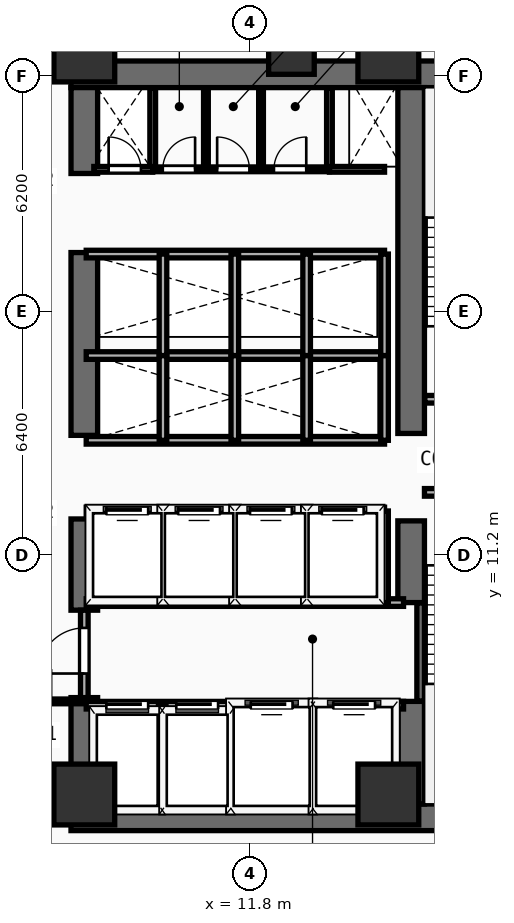
"""IFC4 building model, lengths in metres.
Left out: names, types, materials, properties, quantities, classifications, styles, units other than length and angle.
Written with IfcOpenShell. Run it as: python <this file> out.ifc"""

import sys

from ifc_helpers import new_model, si_unit, direction, frame, frame_2d, origin, origin_2d, place, context, subcontext, project, spatial, rectangle, extrude, element, fill, save


model = new_model("IFC4")
c1 = context("Model", 3, precision=1e-05, world=origin(), true_north=direction((0.0, 1.0)))
c2 = subcontext(c1, "Body", "Model", "MODEL_VIEW")
j1 = project(units=[si_unit("LENGTHUNIT", "METRE"), si_unit("PLANEANGLEUNIT", "RADIAN")], contexts=[c1])
p1 = place(None, origin())
s1 = spatial("IfcSite", under=j1, at=p1, CompositionType="ELEMENT")
p2 = place(p1, origin())
s2 = spatial("IfcBuilding", under=s1, at=p2, CompositionType="ELEMENT")
p3 = place(p2, frame((0.0, 0.0, 79.0)))
s3 = spatial("IfcBuildingStorey", under=s2, at=p3, CompositionType="ELEMENT", Elevation=79.0)
for number, where, z_axis, x_axis in (
    (1, (7.1, 4.3, 0.0), (0.0, 0.0, 1.0), (1.0, 0.0, 0.0)),
    (2, (7.1, 23.85, 0.0), (0.0, 0.0, 1.0), (1.0, 0.0, 0.0)),
):
    element("IfcWall", number, at=place(p3, frame(where, z_axis=z_axis, x_axis=x_axis)), inside=s3, PredefinedType="SHEAR", context=c2, shape_type="SweptSolid", body=[
        extrude(rectangle(XDim=14.05, YDim=0.7, at=frame_2d((7.025, 0.0))), origin(), (0.0, 0.0, 1.0), 3.42),
    ])
p4 = place(p3, frame((7.45, 4.65, 0.0), z_axis=(0.0, 0.0, 1.0), x_axis=(0.0, 1.0, 0.0)))
e3 = element("IfcWall", 3, at=p4, inside=s3, PredefinedType="SHEAR", context=c2, shape_type="SweptSolid", body=[
    extrude(rectangle(XDim=2.8, YDim=0.7, at=frame_2d((1.4, 0.0))), origin(), (0.0, 0.0, 1.0), 3.42),
])
p5 = place(p3, frame((7.45, 9.75, 0.0), z_axis=(0.0, 0.0, 1.0), x_axis=(0.0, 1.0, 0.0)))
e4 = element("IfcWall", 4, at=p5, inside=s3, PredefinedType="SHEAR", context=c2, shape_type="SweptSolid", body=[
    extrude(rectangle(XDim=2.4, YDim=0.7, at=frame_2d((1.2, 0.0))), origin(), (0.0, 0.0, 1.0), 3.42),
])
p6 = place(p3, frame((7.45, 14.35, 0.0), z_axis=(0.0, 0.0, 1.0), x_axis=(0.0, 1.0, 0.0)))
e5 = element("IfcWall", 5, at=p6, inside=s3, PredefinedType="SHEAR", context=c2, shape_type="SweptSolid", body=[
    extrude(rectangle(XDim=4.81, YDim=0.7, at=frame_2d((2.405, 0.0))), origin(), (0.0, 0.0, 1.0), 3.42),
])
p7 = place(p3, frame((7.45, 21.24, 0.0), z_axis=(0.0, 0.0, 1.0), x_axis=(0.0, 1.0, 0.0)))
e6 = element("IfcWall", 6, at=p7, inside=s3, PredefinedType="SHEAR", context=c2, shape_type="SweptSolid", body=[
    extrude(rectangle(XDim=2.26, YDim=0.7, at=frame_2d((1.13, 0.0))), origin(), (0.0, 0.0, 1.0), 3.42),
])
p8 = place(p3, frame((16.05, 4.65, 0.0), z_axis=(0.0, 0.0, 1.0), x_axis=(0.0, 1.0, 0.0)))
e7 = element("IfcWall", 7, at=p8, inside=s3, PredefinedType="SHEAR", context=c2, shape_type="SweptSolid", body=[
    extrude(rectangle(XDim=2.7, YDim=0.7, at=frame_2d((1.35, 0.0))), origin(), (0.0, 0.0, 1.0), 3.42),
])
p9 = place(p3, frame((16.05, 9.95, 0.0), z_axis=(0.0, 0.0, 1.0), x_axis=(0.0, 1.0, 0.0)))
e8 = element("IfcWall", 8, at=p9, inside=s3, PredefinedType="SHEAR", context=c2, shape_type="SweptSolid", body=[
    extrude(rectangle(XDim=2.15, YDim=0.7, at=frame_2d((1.075, 0.0))), origin(), (0.0, 0.0, 1.0), 3.42),
])
p10 = place(p3, frame((16.05, 14.4, 0.0), z_axis=(0.0, 0.0, 1.0), x_axis=(0.0, 1.0, 0.0)))
e9 = element("IfcWall", 9, at=p10, inside=s3, PredefinedType="SHEAR", context=c2, shape_type="SweptSolid", body=[
    extrude(rectangle(XDim=9.1, YDim=0.7, at=frame_2d((4.55, 0.0))), origin(), (0.0, 0.0, 1.0), 3.42),
])
for number, where, z_axis, x_axis in (
    (10, (7.45, 4.9, 0.0), (0.0, 0.0, 1.0), (1.0, 0.0, 0.0)),
    (11, (15.45, 4.9, 0.0), (0.0, 0.0, 1.0), (1.0, 0.0, 0.0)),
    (12, (7.45, 24.45, 0.0), (0.0, 0.0, 1.0), (1.0, 0.0, 0.0)),
    (13, (15.45, 24.45, 0.0), (0.0, 0.0, 1.0), (1.0, 0.0, 0.0)),
):
    element("IfcColumn", number, at=place(p3, frame(where, z_axis=z_axis, x_axis=x_axis)), inside=s3, PredefinedType="COLUMN", context=c2, shape_type="SweptSolid", body=[
        extrude(rectangle(XDim=1.6, YDim=1.6, at=origin_2d()), origin(), (0.0, 0.0, 1.0), 3.42),
    ])
p11 = place(p3, frame((12.9, 24.45, 0.0), z_axis=(0.0, 0.0, 1.0), x_axis=(1.0, 0.0, 0.0)))
e14 = element("IfcColumn", 14, at=p11, inside=s3, PredefinedType="COLUMN", context=c2, shape_type="SweptSolid", body=[
    extrude(rectangle(XDim=1.2, YDim=1.2, at=origin_2d()), origin(), (0.0, 0.0, 1.0), 3.42),
])
p12 = place(p3, frame((16.3, 7.36, 0.0), z_axis=(0.0, 0.0, 1.0), x_axis=(0.0, 1.0, 0.0)))
e15 = element("IfcWall", 15, at=p12, inside=s3, PredefinedType="SHEAR", context=c2, shape_type="SweptSolid", body=[
    extrude(rectangle(XDim=2.58, YDim=0.2, at=frame_2d((1.29, 0.0))), origin(), (0.0, 0.0, 1.0), 3.42),
])
p13 = place(p3, frame((16.4, 12.85, 0.0), z_axis=(0.0, 0.0, 1.0), x_axis=(1.0, 0.0, 0.0)))
e16 = element("IfcWall", 16, at=p13, inside=s3, PredefinedType="PARTITIONING", context=c2, shape_type="SweptSolid", body=[
    extrude(rectangle(XDim=3.96, YDim=0.2, at=frame_2d((1.98, 0.0))), origin(), (0.0, 0.0, 1.0), 3.42),
])
p14 = place(p13, frame((1.304, 0.0, 0.0)))
e17 = element("IfcOpeningElement", 17, at=p14, cuts=e16, PredefinedType="OPENING", context=c2, shape_type="SweptSolid", body=[
    extrude(rectangle(XDim=1.1, YDim=2.2, at=frame_2d((0.55, 1.1))), frame((0.0, 0.11, 0.0), z_axis=(0.0, -1.0, 0.0), x_axis=(1.0, 0.0, 0.0)), (0.0, 0.0, 1.0), 0.22),
])
p15 = place(p3, frame((16.41, 15.3, 0.0), z_axis=(0.0, 0.0, 1.0), x_axis=(1.0, 0.0, 0.0)))
e18 = element("IfcWall", 18, at=p15, inside=s3, PredefinedType="PARTITIONING", context=c2, shape_type="SweptSolid", body=[
    extrude(rectangle(XDim=3.95, YDim=0.2, at=frame_2d((1.975, 0.0))), origin(), (0.0, 0.0, 1.0), 3.42),
])
p16 = place(p15, frame((1.294, 0.0, 0.0)))
e19 = element("IfcOpeningElement", 19, at=p16, cuts=e18, PredefinedType="OPENING", context=c2, shape_type="SweptSolid", body=[
    extrude(rectangle(XDim=1.1, YDim=2.2, at=frame_2d((0.55, 1.1))), frame((0.0, 0.11, 0.0), z_axis=(0.0, -1.0, 0.0), x_axis=(1.0, 0.0, 0.0)), (0.0, 0.0, 1.0), 0.22),
])
p17 = place(p3, frame((7.5, 7.25, 0.0), z_axis=(0.0, 0.0, 1.0), x_axis=(1.0, 0.0, 0.0)))
e20 = element("IfcWall", 20, at=p17, inside=s3, PredefinedType="PARTITIONING", context=c2, shape_type="SweptSolid", body=[
    extrude(rectangle(XDim=8.35, YDim=0.2, at=frame_2d((4.175, 0.0))), origin(), (0.0, 0.0, 1.0), 3.42),
])
p18 = place(p17, frame((0.53, 0.0, 0.0)))
e21 = element("IfcOpeningElement", 21, at=p18, cuts=e20, PredefinedType="OPENING", context=c2, shape_type="SweptSolid", body=[
    extrude(rectangle(XDim=1.1, YDim=2.2, at=frame_2d((0.55, 1.1))), frame((0.0, 0.11, 0.0), z_axis=(0.0, -1.0, 0.0), x_axis=(1.0, 0.0, 0.0)), (0.0, 0.0, 1.0), 0.22),
])
p19 = place(p17, frame((2.37, 0.0, 0.0)))
e22 = element("IfcOpeningElement", 22, at=p19, cuts=e20, PredefinedType="OPENING", context=c2, shape_type="SweptSolid", body=[
    extrude(rectangle(XDim=1.1, YDim=2.2, at=frame_2d((0.55, 1.1))), frame((0.0, 0.11, 0.0), z_axis=(0.0, -1.0, 0.0), x_axis=(1.0, 0.0, 0.0)), (0.0, 0.0, 1.0), 0.22),
])
p20 = place(p17, frame((4.33, 0.0, 0.0)))
e23 = element("IfcOpeningElement", 23, at=p20, cuts=e20, PredefinedType="OPENING", context=c2, shape_type="SweptSolid", body=[
    extrude(rectangle(XDim=1.1, YDim=2.2, at=frame_2d((0.55, 1.1))), frame((0.0, 0.11, 0.0), z_axis=(0.0, -1.0, 0.0), x_axis=(1.0, 0.0, 0.0)), (0.0, 0.0, 1.0), 0.22),
])
p21 = place(p17, frame((6.5, 0.0, 0.0)))
e24 = element("IfcOpeningElement", 24, at=p21, cuts=e20, PredefinedType="OPENING", context=c2, shape_type="SweptSolid", body=[
    extrude(rectangle(XDim=1.1, YDim=2.2, at=frame_2d((0.55, 1.1))), frame((0.0, 0.11, 0.0), z_axis=(0.0, -1.0, 0.0), x_axis=(1.0, 0.0, 0.0)), (0.0, 0.0, 1.0), 0.22),
])
p22 = place(p3, frame((7.5, 9.95, 0.0), z_axis=(0.0, 0.0, 1.0), x_axis=(1.0, 0.0, 0.0)))
e25 = element("IfcWall", 25, at=p22, inside=s3, PredefinedType="PARTITIONING", context=c2, shape_type="SweptSolid", body=[
    extrude(rectangle(XDim=8.35, YDim=0.2, at=frame_2d((4.175, 0.0))), origin(), (0.0, 0.0, 1.0), 3.42),
])
for number, where, z_axis, x_axis in (
    (26, (9.5, 4.45, 0.0), (0.0, 0.0, 1.0), (0.0, 1.0, 0.0)),
    (27, (11.36, 4.45, 0.0), (0.0, 0.0, 1.0), (0.0, 1.0, 0.0)),
    (28, (13.46, 4.45, 0.0), (0.0, 0.0, 1.0), (0.0, 1.0, 0.0)),
):
    element("IfcWall", number, at=place(p3, frame(where, z_axis=z_axis, x_axis=x_axis)), inside=s3, PredefinedType="PARTITIONING", context=c2, shape_type="SweptSolid", body=[
        extrude(rectangle(XDim=2.8, YDim=0.2, at=frame_2d((1.4, 0.0))), origin(), (0.0, 0.0, 1.0), 3.42),
    ])
p23 = place(p3, frame((7.45, 7.45, 0.0), z_axis=(0.0, 0.0, 1.0), x_axis=(0.0, 1.0, 0.0)))
e29 = element("IfcWall", 29, at=p23, inside=s3, PredefinedType="PARTITIONING", context=c2, shape_type="SweptSolid", body=[
    extrude(rectangle(XDim=2.3, YDim=0.2, at=frame_2d((1.15, 0.0))), origin(), (0.0, 0.0, 1.0), 2.4),
])
p24 = place(p23, frame((0.633, 0.0, 0.0)))
e30 = element("IfcOpeningElement", 30, at=p24, cuts=e29, PredefinedType="OPENING", context=c2, shape_type="SweptSolid", body=[
    extrude(rectangle(XDim=1.2, YDim=2.25, at=frame_2d((0.6, 1.125))), frame((0.0, 0.11, 0.0), z_axis=(0.0, -1.0, 0.0), x_axis=(1.0, 0.0, 0.0)), (0.0, 0.0, 1.0), 0.22),
])
p25 = place(p3, frame((7.5, 12.36, 0.0), z_axis=(0.0, 0.0, 1.0), x_axis=(1.0, 0.0, 0.0)))
e31 = element("IfcWall", 31, at=p25, inside=s3, PredefinedType="PARTITIONING", context=c2, shape_type="SweptSolid", body=[
    extrude(rectangle(XDim=7.85, YDim=0.2, at=frame_2d((3.925, 0.0))), origin(), (0.0, 0.0, 1.0), 3.42),
])
p26 = place(p25, frame((0.53, 0.0, 0.0)))
e32 = element("IfcOpeningElement", 32, at=p26, cuts=e31, PredefinedType="OPENING", context=c2, shape_type="SweptSolid", body=[
    extrude(rectangle(XDim=1.1, YDim=2.2, at=frame_2d((0.55, 1.1))), frame((0.0, 0.11, 0.0), z_axis=(0.0, -1.0, 0.0), x_axis=(1.0, 0.0, 0.0)), (0.0, 0.0, 1.0), 0.22),
])
p27 = place(p25, frame((2.42, 0.0, 0.0)))
e33 = element("IfcOpeningElement", 33, at=p27, cuts=e31, PredefinedType="OPENING", context=c2, shape_type="SweptSolid", body=[
    extrude(rectangle(XDim=1.1, YDim=2.2, at=frame_2d((0.55, 1.1))), frame((0.0, 0.11, 0.0), z_axis=(0.0, -1.0, 0.0), x_axis=(1.0, 0.0, 0.0)), (0.0, 0.0, 1.0), 0.22),
])
p28 = place(p25, frame((4.31, 0.0, 0.0)))
e34 = element("IfcOpeningElement", 34, at=p28, cuts=e31, PredefinedType="OPENING", context=c2, shape_type="SweptSolid", body=[
    extrude(rectangle(XDim=1.1, YDim=2.2, at=frame_2d((0.55, 1.1))), frame((0.0, 0.11, 0.0), z_axis=(0.0, -1.0, 0.0), x_axis=(1.0, 0.0, 0.0)), (0.0, 0.0, 1.0), 0.22),
])
p29 = place(p25, frame((6.2, 0.0, 0.0)))
e35 = element("IfcOpeningElement", 35, at=p29, cuts=e31, PredefinedType="OPENING", context=c2, shape_type="SweptSolid", body=[
    extrude(rectangle(XDim=1.1, YDim=2.2, at=frame_2d((0.55, 1.1))), frame((0.0, 0.11, 0.0), z_axis=(0.0, -1.0, 0.0), x_axis=(1.0, 0.0, 0.0)), (0.0, 0.0, 1.0), 0.22),
])
for number, where, z_axis, x_axis in (
    (36, (15.35, 9.95, 0.0), (0.0, 0.0, 1.0), (0.0, 1.0, 0.0)),
    (37, (9.52, 9.95, 0.0), (0.0, 0.0, 1.0), (0.0, 1.0, 0.0)),
    (38, (11.41, 9.95, 0.0), (0.0, 0.0, 1.0), (0.0, 1.0, 0.0)),
    (39, (13.3, 9.95, 0.0), (0.0, 0.0, 1.0), (0.0, 1.0, 0.0)),
):
    element("IfcWall", number, at=place(p3, frame(where, z_axis=z_axis, x_axis=x_axis)), inside=s3, PredefinedType="PARTITIONING", context=c2, shape_type="SweptSolid", body=[
        extrude(rectangle(XDim=2.41, YDim=0.2, at=frame_2d((1.205, 0.0))), origin(), (0.0, 0.0, 1.0), 3.42),
    ])
for number, where, z_axis, x_axis in (
    (40, (7.5, 14.22, 0.0), (0.0, 0.0, 1.0), (1.0, 0.0, 0.0)),
    (41, (7.5, 16.45, 0.0), (0.0, 0.0, 1.0), (1.0, 0.0, 0.0)),
):
    element("IfcWall", number, at=place(p3, frame(where, z_axis=z_axis, x_axis=x_axis)), inside=s3, PredefinedType="PARTITIONING", context=c2, shape_type="SweptSolid", body=[
        extrude(rectangle(XDim=7.85, YDim=0.2, at=frame_2d((3.925, 0.0))), origin(), (0.0, 0.0, 1.0), 3.42),
    ])
for number, where, z_axis, x_axis in (
    (42, (15.35, 14.22, 0.0), (0.0, 0.0, 1.0), (0.0, 1.0, 0.0)),
    (43, (9.52, 14.22, 0.0), (0.0, 0.0, 1.0), (0.0, 1.0, 0.0)),
    (44, (11.41, 14.22, 0.0), (0.0, 0.0, 1.0), (0.0, 1.0, 0.0)),
    (45, (13.3, 14.22, 0.0), (0.0, 0.0, 1.0), (0.0, 1.0, 0.0)),
):
    element("IfcWall", number, at=place(p3, frame(where, z_axis=z_axis, x_axis=x_axis)), inside=s3, PredefinedType="PARTITIONING", context=c2, shape_type="SweptSolid", body=[
        extrude(rectangle(XDim=2.23, YDim=0.2, at=frame_2d((1.115, 0.0))), origin(), (0.0, 0.0, 1.0), 3.42),
    ])
p30 = place(p3, frame((7.5, 19.12, 0.0), z_axis=(0.0, 0.0, 1.0), x_axis=(1.0, 0.0, 0.0)))
e46 = element("IfcWall", 46, at=p30, inside=s3, PredefinedType="PARTITIONING", context=c2, shape_type="SweptSolid", body=[
    extrude(rectangle(XDim=7.85, YDim=0.2, at=frame_2d((3.925, 0.0))), origin(), (0.0, 0.0, 1.0), 3.42),
])
for number, where, z_axis, x_axis in (
    (47, (15.35, 16.45, 0.0), (0.0, 0.0, 1.0), (0.0, 1.0, 0.0)),
    (48, (9.52, 16.45, 0.0), (0.0, 0.0, 1.0), (0.0, 1.0, 0.0)),
    (49, (11.41, 16.45, 0.0), (0.0, 0.0, 1.0), (0.0, 1.0, 0.0)),
    (50, (13.3, 16.45, 0.0), (0.0, 0.0, 1.0), (0.0, 1.0, 0.0)),
):
    element("IfcWall", number, at=place(p3, frame(where, z_axis=z_axis, x_axis=x_axis)), inside=s3, PredefinedType="PARTITIONING", context=c2, shape_type="SweptSolid", body=[
        extrude(rectangle(XDim=2.67, YDim=0.2, at=frame_2d((1.335, 0.0))), origin(), (0.0, 0.0, 1.0), 3.42),
    ])
for number, where, z_axis, x_axis in (
    (51, (9.25, 21.35, 0.0), (0.0, 0.0, 1.0), (0.0, 1.0, 0.0)),
    (52, (13.9, 21.35, 0.0), (0.0, 0.0, 1.0), (0.0, 1.0, 0.0)),
):
    element("IfcWall", number, at=place(p3, frame(where, z_axis=z_axis, x_axis=x_axis)), inside=s3, PredefinedType="PARTITIONING", context=c2, shape_type="SweptSolid", body=[
        extrude(rectangle(XDim=2.13, YDim=0.15, at=frame_2d((1.065, 0.0))), origin(), (0.0, 0.0, 1.0), 3.42),
    ])
p31 = place(p3, frame((7.7, 21.35, 0.0), z_axis=(0.0, 0.0, 1.0), x_axis=(1.0, 0.0, 0.0)))
e53 = element("IfcWall", 53, at=p31, inside=s3, PredefinedType="PARTITIONING", context=c2, shape_type="SweptSolid", body=[
    extrude(rectangle(XDim=1.55, YDim=0.15, at=frame_2d((0.775, 0.0))), origin(), (0.0, 0.0, 1.0), 3.42),
])
p32 = place(p31, frame((0.39, 0.0, 0.0)))
e54 = element("IfcOpeningElement", 54, at=p32, cuts=e53, PredefinedType="OPENING", context=c2, shape_type="SweptSolid", body=[
    extrude(rectangle(XDim=0.85, YDim=2.15, at=frame_2d((0.425, 1.075))), frame((0.0, 0.085, 0.0), z_axis=(0.0, -1.0, 0.0), x_axis=(1.0, 0.0, 0.0)), (0.0, 0.0, 1.0), 0.17),
])
p33 = place(p3, frame((13.9, 21.35, 0.0), z_axis=(0.0, 0.0, 1.0), x_axis=(1.0, 0.0, 0.0)))
e55 = element("IfcWall", 55, at=p33, inside=s3, PredefinedType="PARTITIONING", context=c2, shape_type="SweptSolid", body=[
    extrude(rectangle(XDim=1.45, YDim=0.15, at=frame_2d((0.725, 0.0))), origin(), (0.0, 0.0, 1.0), 3.42),
])
p34 = place(p3, frame((9.25, 21.35, 0.0), z_axis=(0.0, 0.0, 1.0), x_axis=(1.0, 0.0, 0.0)))
e56 = element("IfcWall", 56, at=p34, inside=s3, PredefinedType="PARTITIONING", context=c2, shape_type="SweptSolid", body=[
    extrude(rectangle(XDim=4.65, YDim=0.125, at=frame_2d((2.325, 0.0))), origin(), (0.0, 0.0, 1.0), 3.42),
])
p35 = place(p34, frame((0.265, 0.0, 0.0)))
e57 = element("IfcOpeningElement", 57, at=p35, cuts=e56, PredefinedType="OPENING", context=c2, shape_type="SweptSolid", body=[
    extrude(rectangle(XDim=0.85, YDim=2.15, at=frame_2d((0.425, 1.075))), frame((0.0, 0.073, 0.0), z_axis=(0.0, -1.0, 0.0), x_axis=(1.0, 0.0, 0.0)), (0.0, 0.0, 1.0), 0.145),
])
p36 = place(p34, frame((1.695, 0.0, 0.0)))
e58 = element("IfcOpeningElement", 58, at=p36, cuts=e56, PredefinedType="OPENING", context=c2, shape_type="SweptSolid", body=[
    extrude(rectangle(XDim=0.85, YDim=2.15, at=frame_2d((0.425, 1.075))), frame((0.0, 0.073, 0.0), z_axis=(0.0, -1.0, 0.0), x_axis=(1.0, 0.0, 0.0)), (0.0, 0.0, 1.0), 0.145),
])
p37 = place(p34, frame((3.19, 0.0, 0.0)))
e59 = element("IfcOpeningElement", 59, at=p37, cuts=e56, PredefinedType="OPENING", context=c2, shape_type="SweptSolid", body=[
    extrude(rectangle(XDim=0.85, YDim=2.15, at=frame_2d((0.425, 1.075))), frame((0.0, 0.073, 0.0), z_axis=(0.0, -1.0, 0.0), x_axis=(1.0, 0.0, 0.0)), (0.0, 0.0, 1.0), 0.145),
])
for number, where, z_axis, x_axis in (
    (60, (10.65, 21.35, 0.0), (0.0, 0.0, 1.0), (0.0, 1.0, 0.0)),
    (61, (12.1, 21.35, 0.0), (0.0, 0.0, 1.0), (0.0, 1.0, 0.0)),
):
    element("IfcWall", number, at=place(p3, frame(where, z_axis=z_axis, x_axis=x_axis)), inside=s3, PredefinedType="PARTITIONING", context=c2, shape_type="SweptSolid", body=[
        extrude(rectangle(XDim=2.1, YDim=0.125, at=frame_2d((1.05, 0.0))), origin(), (0.0, 0.0, 1.0), 3.42),
    ])
p38 = place(p3, frame((1.64, 7.35, 0.0), z_axis=(0.0, 0.0, 1.0), x_axis=(1.0, 0.0, 0.0)))
e62 = element("IfcWall", 62, at=p38, inside=s3, PredefinedType="PARTITIONING", context=c2, shape_type="SweptSolid", body=[
    extrude(rectangle(XDim=5.76, YDim=0.125, at=frame_2d((2.88, 0.0))), origin(), (0.0, 0.0, 1.0), 3.42),
])
p39 = place(p38, frame((4.087, 0.0, 0.0)))
e63 = element("IfcOpeningElement", 63, at=p39, cuts=e62, PredefinedType="OPENING", context=c2, shape_type="SweptSolid", body=[
    extrude(rectangle(XDim=0.85, YDim=2.15, at=frame_2d((0.425, 1.075))), frame((0.0, 0.073, 0.0), z_axis=(0.0, -1.0, 0.0), x_axis=(1.0, 0.0, 0.0)), (0.0, 0.0, 1.0), 0.145),
])
p40 = place(p18, origin())
e64 = element("IfcDoor", 64, at=p40, inside=s3, OperationType="SLIDING_TO_LEFT", PredefinedType="DOOR", context=c2, shape_type="SweptSolid", body=[
    extrude(rectangle(XDim=1.1, YDim=2.2, at=frame_2d((0.55, 1.1))), frame((0.0, 0.025, 0.0), z_axis=(0.0, -1.0, 0.0), x_axis=(1.0, 0.0, 0.0)), (0.0, 0.0, 1.0), 0.05),
])
fill(e21, e64)
p41 = place(p19, origin())
e65 = element("IfcDoor", 65, at=p41, inside=s3, OperationType="SLIDING_TO_LEFT", PredefinedType="DOOR", context=c2, shape_type="SweptSolid", body=[
    extrude(rectangle(XDim=1.1, YDim=2.2, at=frame_2d((0.55, 1.1))), frame((0.0, 0.025, 0.0), z_axis=(0.0, -1.0, 0.0), x_axis=(1.0, 0.0, 0.0)), (0.0, 0.0, 1.0), 0.05),
])
fill(e22, e65)
p42 = place(p20, origin())
e66 = element("IfcDoor", 66, at=p42, inside=s3, OperationType="SLIDING_TO_LEFT", PredefinedType="DOOR", context=c2, shape_type="SweptSolid", body=[
    extrude(rectangle(XDim=1.1, YDim=2.2, at=frame_2d((0.55, 1.1))), frame((0.0, 0.025, 0.0), z_axis=(0.0, -1.0, 0.0), x_axis=(1.0, 0.0, 0.0)), (0.0, 0.0, 1.0), 0.05),
])
fill(e23, e66)
p43 = place(p21, origin())
e67 = element("IfcDoor", 67, at=p43, inside=s3, OperationType="SLIDING_TO_LEFT", PredefinedType="DOOR", context=c2, shape_type="SweptSolid", body=[
    extrude(rectangle(XDim=1.1, YDim=2.2, at=frame_2d((0.55, 1.1))), frame((0.0, 0.025, 0.0), z_axis=(0.0, -1.0, 0.0), x_axis=(1.0, 0.0, 0.0)), (0.0, 0.0, 1.0), 0.05),
])
fill(e24, e67)
p44 = place(p24, frame((1.2, 0.0, 0.0), z_axis=(0.0, 0.0, 1.0), x_axis=(-1.0, 0.0, 0.0)))
e68 = element("IfcDoor", 68, at=p44, inside=s3, OperationType="SINGLE_SWING_RIGHT", PredefinedType="DOOR", context=c2, shape_type="SweptSolid", body=[
    extrude(rectangle(XDim=1.2, YDim=2.25, at=frame_2d((0.6, 1.125))), frame((0.0, 0.025, 0.0), z_axis=(0.0, -1.0, 0.0), x_axis=(1.0, 0.0, 0.0)), (0.0, 0.0, 1.0), 0.05),
])
fill(e30, e68)
p45 = place(p26, origin())
e69 = element("IfcDoor", 69, at=p45, inside=s3, OperationType="SLIDING_TO_LEFT", PredefinedType="DOOR", context=c2, shape_type="SweptSolid", body=[
    extrude(rectangle(XDim=1.1, YDim=2.2, at=frame_2d((0.55, 1.1))), frame((0.0, 0.025, 0.0), z_axis=(0.0, -1.0, 0.0), x_axis=(1.0, 0.0, 0.0)), (0.0, 0.0, 1.0), 0.05),
])
fill(e32, e69)
p46 = place(p27, origin())
e70 = element("IfcDoor", 70, at=p46, inside=s3, OperationType="SLIDING_TO_LEFT", PredefinedType="DOOR", context=c2, shape_type="SweptSolid", body=[
    extrude(rectangle(XDim=1.1, YDim=2.2, at=frame_2d((0.55, 1.1))), frame((0.0, 0.025, 0.0), z_axis=(0.0, -1.0, 0.0), x_axis=(1.0, 0.0, 0.0)), (0.0, 0.0, 1.0), 0.05),
])
fill(e33, e70)
p47 = place(p28, origin())
e71 = element("IfcDoor", 71, at=p47, inside=s3, OperationType="SLIDING_TO_LEFT", PredefinedType="DOOR", context=c2, shape_type="SweptSolid", body=[
    extrude(rectangle(XDim=1.1, YDim=2.2, at=frame_2d((0.55, 1.1))), frame((0.0, 0.025, 0.0), z_axis=(0.0, -1.0, 0.0), x_axis=(1.0, 0.0, 0.0)), (0.0, 0.0, 1.0), 0.05),
])
fill(e34, e71)
p48 = place(p29, origin())
e72 = element("IfcDoor", 72, at=p48, inside=s3, OperationType="SLIDING_TO_LEFT", PredefinedType="DOOR", context=c2, shape_type="SweptSolid", body=[
    extrude(rectangle(XDim=1.1, YDim=2.2, at=frame_2d((0.55, 1.1))), frame((0.0, 0.025, 0.0), z_axis=(0.0, -1.0, 0.0), x_axis=(1.0, 0.0, 0.0)), (0.0, 0.0, 1.0), 0.05),
])
fill(e35, e72)
p49 = place(p32, origin())
e73 = element("IfcDoor", 73, at=p49, inside=s3, OperationType="SINGLE_SWING_LEFT", PredefinedType="DOOR", context=c2, shape_type="SweptSolid", body=[
    extrude(rectangle(XDim=0.85, YDim=2.15, at=frame_2d((0.425, 1.075))), frame((0.0, 0.025, 0.0), z_axis=(0.0, -1.0, 0.0), x_axis=(1.0, 0.0, 0.0)), (0.0, 0.0, 1.0), 0.05),
])
fill(e54, e73)
p50 = place(p35, origin())
e74 = element("IfcDoor", 74, at=p50, inside=s3, OperationType="SINGLE_SWING_RIGHT", PredefinedType="DOOR", context=c2, shape_type="SweptSolid", body=[
    extrude(rectangle(XDim=0.85, YDim=2.15, at=frame_2d((0.425, 1.075))), frame((0.0, 0.025, 0.0), z_axis=(0.0, -1.0, 0.0), x_axis=(1.0, 0.0, 0.0)), (0.0, 0.0, 1.0), 0.05),
])
fill(e57, e74)
p51 = place(p36, origin())
e75 = element("IfcDoor", 75, at=p51, inside=s3, OperationType="SINGLE_SWING_LEFT", PredefinedType="DOOR", context=c2, shape_type="SweptSolid", body=[
    extrude(rectangle(XDim=0.85, YDim=2.15, at=frame_2d((0.425, 1.075))), frame((0.0, 0.025, 0.0), z_axis=(0.0, -1.0, 0.0), x_axis=(1.0, 0.0, 0.0)), (0.0, 0.0, 1.0), 0.05),
])
fill(e58, e75)
p52 = place(p37, origin())
e76 = element("IfcDoor", 76, at=p52, inside=s3, OperationType="SINGLE_SWING_RIGHT", PredefinedType="DOOR", context=c2, shape_type="SweptSolid", body=[
    extrude(rectangle(XDim=0.85, YDim=2.15, at=frame_2d((0.425, 1.075))), frame((0.0, 0.025, 0.0), z_axis=(0.0, -1.0, 0.0), x_axis=(1.0, 0.0, 0.0)), (0.0, 0.0, 1.0), 0.05),
])
fill(e59, e76)
save(model, sys.argv[1])
